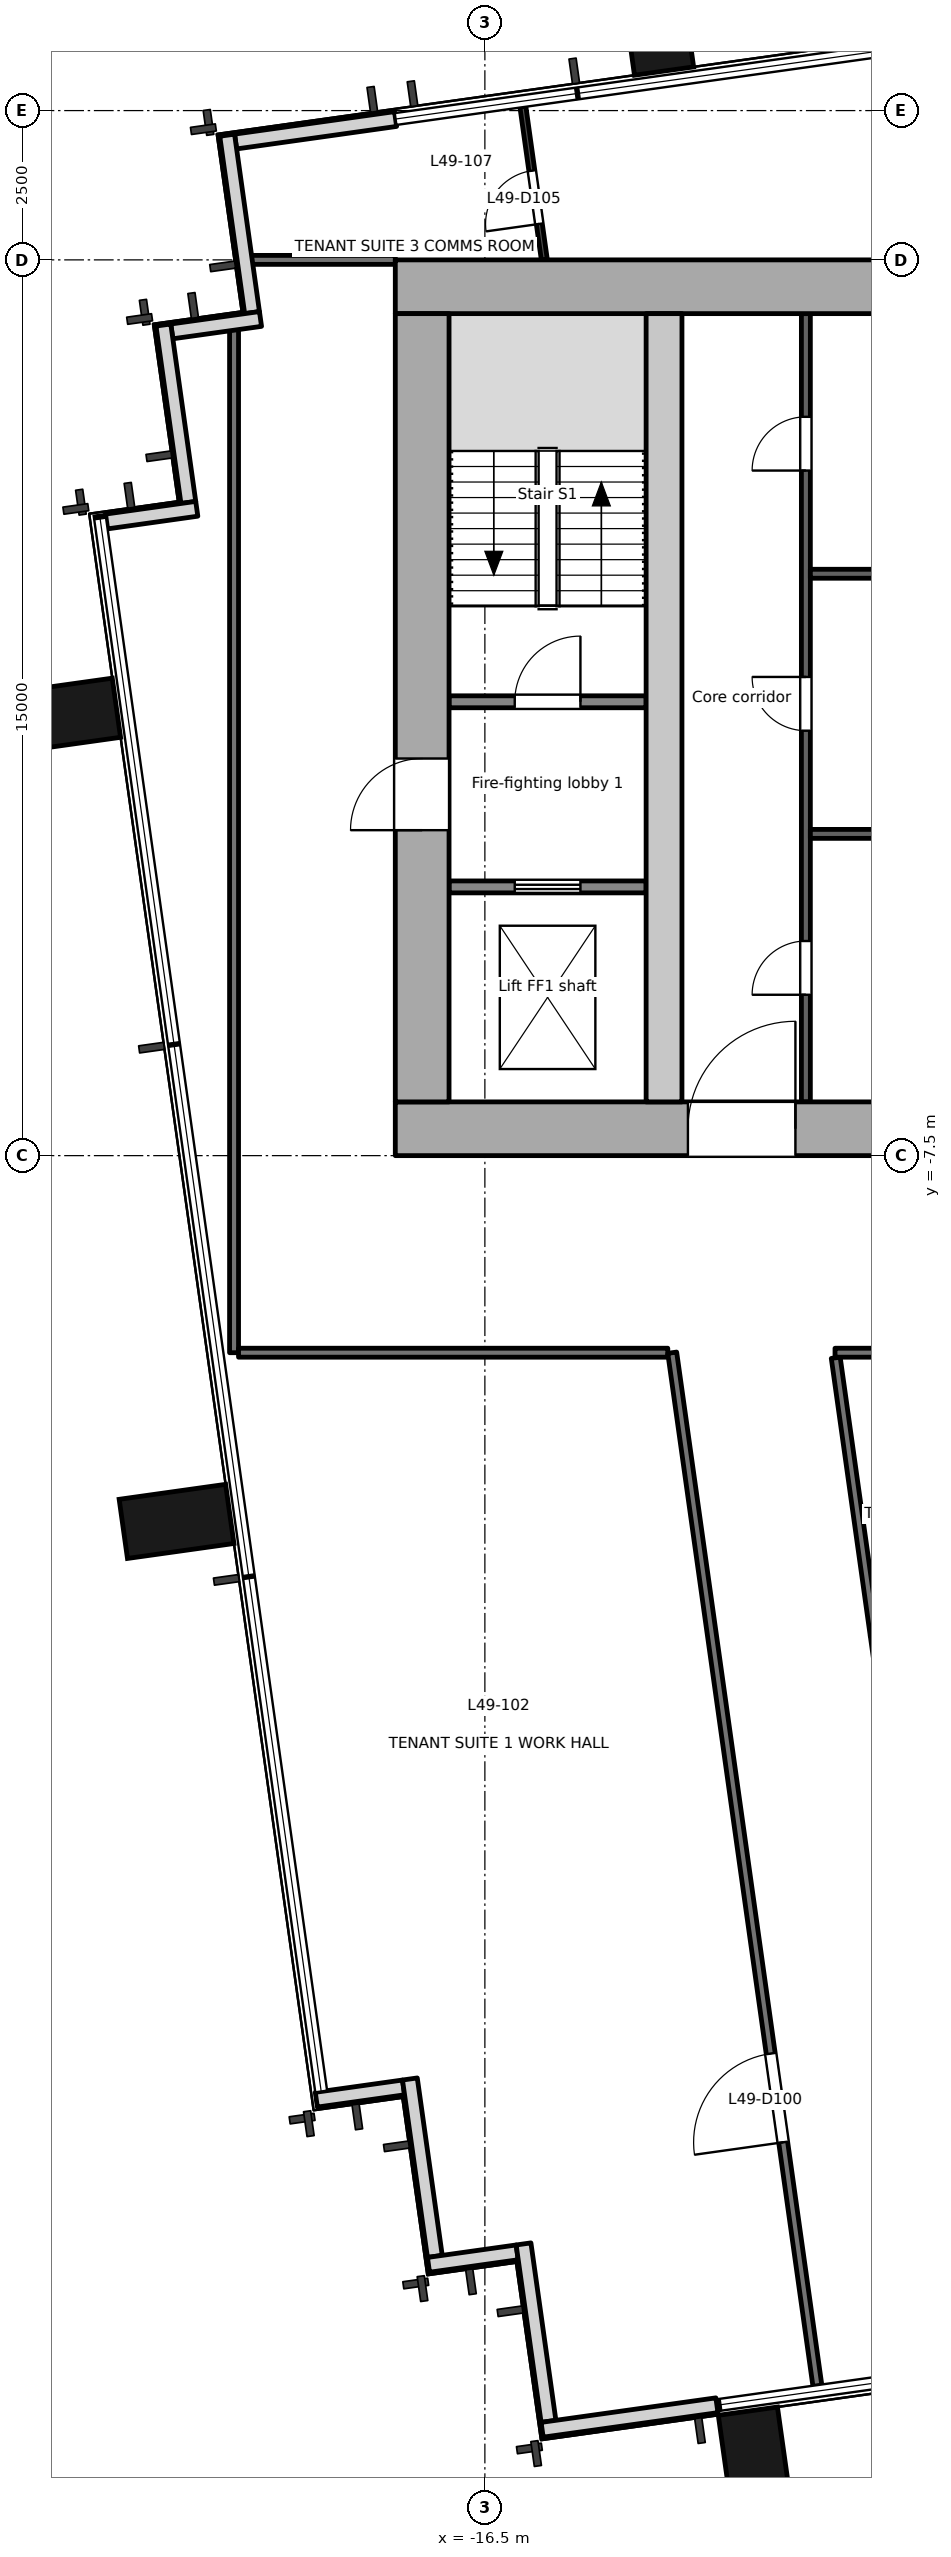
"""IFC4 building model, lengths in metres.
Left out: names, types, materials, properties, quantities, classifications, styles, units other than length and angle.
Written with IfcOpenShell. Run it as: python <this file> out.ifc"""

import sys

from ifc_helpers import new_model, si_unit, direction, frame, frame_2d, origin, origin_2d, place, context, subcontext, project, spatial, rectangle, extrude, element, fill, save


model = new_model("IFC4")
c1 = context("Model", 3, precision=1e-05, world=origin(), true_north=direction((0.0, 1.0)))
c2 = subcontext(c1, "Body", "Model", "MODEL_VIEW")
j1 = project(units=[si_unit("LENGTHUNIT", "METRE"), si_unit("PLANEANGLEUNIT", "RADIAN")], contexts=[c1])
p1 = place(None, origin())
s1 = spatial("IfcSite", under=j1, at=p1, CompositionType="ELEMENT")
p2 = place(p1, origin())
s2 = spatial("IfcBuilding", under=s1, at=p2, CompositionType="ELEMENT")
p3 = place(p2, frame((0.0, 0.0, 217.4)))
s3 = spatial("IfcBuildingStorey", under=s2, at=p3, CompositionType="ELEMENT", Elevation=217.4)
for number, where, z_axis, x_axis in (
    (1, (-11.971, -29.416, -0.2), (0.0, 0.0, 1.0), (0.99, 0.139, 0.0)),
    (2, (-21.663, -13.625, -0.2), (0.0, 0.0, 1.0), (-0.139, 0.99, 0.0)),
    (3, (-23.561, -0.125, -0.2), (0.0, 0.0, 1.0), (-0.139, 0.99, 0.0)),
    (4, (-13.625, 11.553, -0.2), (0.0, 0.0, 1.0), (0.99, 0.139, 0.0)),
):
    element("IfcColumn", number, at=place(p3, frame(where, z_axis=z_axis, x_axis=x_axis)), inside=s3, PredefinedType="COLUMN", context=c2, shape_type="SweptSolid", body=[
        extrude(rectangle(XDim=1.0, YDim=1.8, at=origin_2d()), origin(), (0.0, 0.0, 1.0), 3.9),
    ])
p4 = place(p3, frame((-17.995, 9.859, 0.0), z_axis=(0.0, 0.0, 1.0), x_axis=(-0.99024510326, -0.139336411139, 0.0)))
e5 = element("IfcWall", 5, at=p4, inside=s3, PredefinedType="SOLIDWALL", context=c2, shape_type="SweptSolid", body=[
    extrude(rectangle(XDim=2.705, YDim=0.25, at=frame_2d((1.353, 0.0))), origin(), (0.0, 0.0, 1.0), 3.7),
])
p5 = place(p3, frame((-20.815, 9.588, 0.0), z_axis=(0.0, 0.0, 1.0), x_axis=(0.138983028379, -0.9902947631, 0.0)))
e6 = element("IfcWall", 6, at=p5, inside=s3, PredefinedType="SOLIDWALL", context=c2, shape_type="SweptSolid", body=[
    extrude(rectangle(XDim=3.0, YDim=0.25, at=frame_2d((1.5, 0.0))), origin(), (0.0, 0.0, 1.0), 3.7),
])
p6 = place(p3, frame((-20.257, 6.51, 0.0), z_axis=(0.0, 0.0, 1.0), x_axis=(-0.990330117064, -0.138730887823, 0.0)))
e7 = element("IfcWall", 7, at=p6, inside=s3, PredefinedType="SOLIDWALL", context=c2, shape_type="SweptSolid", body=[
    extrude(rectangle(XDim=1.499, YDim=0.25, at=frame_2d((0.75, 0.0))), origin(), (0.0, 0.0, 1.0), 3.7),
])
p7 = place(p3, frame((-21.883, 6.409, 0.0), z_axis=(0.0, 0.0, 1.0), x_axis=(0.139324658755, -0.990246756855, 0.0)))
e8 = element("IfcWall", 8, at=p7, inside=s3, PredefinedType="SOLIDWALL", context=c2, shape_type="SweptSolid", body=[
    extrude(rectangle(XDim=3.0, YDim=0.25, at=frame_2d((1.5, 0.0))), origin(), (0.0, 0.0, 1.0), 3.7),
])
p8 = place(p3, frame((-21.324, 3.332, 0.0), z_axis=(0.0, 0.0, 1.0), x_axis=(-0.990238641016, -0.139382329723, 0.0)))
e9 = element("IfcWall", 9, at=p8, inside=s3, PredefinedType="SOLIDWALL", context=c2, shape_type="SweptSolid", body=[
    extrude(rectangle(XDim=1.526, YDim=0.25, at=frame_2d((0.763, 0.0))), origin(), (0.0, 0.0, 1.0), 3.7),
])
p9 = place(p3, frame((-19.322, -23.309, 0.0), z_axis=(0.0, 0.0, 1.0), x_axis=(0.990235520307, 0.13940449893, 0.0)))
e10 = element("IfcWall", 10, at=p9, inside=s3, PredefinedType="SOLIDWALL", context=c2, shape_type="SweptSolid", body=[
    extrude(rectangle(XDim=1.475, YDim=0.25, at=frame_2d((0.737, 0.0))), origin(), (0.0, 0.0, 1.0), 3.7),
])
p10 = place(p3, frame((-17.756, -22.962, 0.0), z_axis=(0.0, 0.0, 1.0), x_axis=(0.139393225799, -0.990237107263, 0.0)))
e11 = element("IfcWall", 11, at=p10, inside=s3, PredefinedType="SOLIDWALL", context=c2, shape_type="SweptSolid", body=[
    extrude(rectangle(XDim=3.0, YDim=0.25, at=frame_2d((1.5, 0.0))), origin(), (0.0, 0.0, 1.0), 3.7),
])
p11 = place(p3, frame((-17.444, -26.074, 0.0), z_axis=(0.0, 0.0, 1.0), x_axis=(0.990240434918, 0.139369584395, 0.0)))
e12 = element("IfcWall", 12, at=p11, inside=s3, PredefinedType="SOLIDWALL", context=c2, shape_type="SweptSolid", body=[
    extrude(rectangle(XDim=1.5, YDim=0.25, at=frame_2d((0.75, 0.0))), origin(), (0.0, 0.0, 1.0), 3.7),
])
p12 = place(p3, frame((-15.853, -25.724, 0.0), z_axis=(0.0, 0.0, 1.0), x_axis=(0.139302206688, -0.990249915532, 0.0)))
e13 = element("IfcWall", 13, at=p12, inside=s3, PredefinedType="SOLIDWALL", context=c2, shape_type="SweptSolid", body=[
    extrude(rectangle(XDim=3.0, YDim=0.25, at=frame_2d((1.5, 0.0))), origin(), (0.0, 0.0, 1.0), 3.7),
])
p13 = place(p3, frame((-15.541, -28.836, 0.0), z_axis=(0.0, 0.0, 1.0), x_axis=(0.990285396533, 0.139049751574, 0.0)))
e14 = element("IfcWall", 14, at=p13, inside=s3, PredefinedType="SOLIDWALL", context=c2, shape_type="SweptSolid", body=[
    extrude(rectangle(XDim=2.955, YDim=0.25, at=frame_2d((1.478, 0.0))), origin(), (0.0, 0.0, 1.0), 3.7),
])
p14 = place(p3, frame((-18.0, -7.05, -0.2), z_axis=(0.0, 0.0, 1.0), x_axis=(1.0, 0.0, 0.0)))
e15 = element("IfcWall", 15, at=p14, inside=s3, PredefinedType="SHEAR", context=c2, shape_type="SweptSolid", body=[
    extrude(rectangle(XDim=36.0, YDim=0.9, at=frame_2d((18.0, 0.0))), origin(), (0.0, 0.0, 1.0), 3.9),
])
p15 = place(p14, frame((4.9, 0.0, 0.2)))
e16 = element("IfcOpeningElement", 16, at=p15, cuts=e15, PredefinedType="OPENING", context=c2, shape_type="SweptSolid", body=[
    extrude(rectangle(XDim=1.8, YDim=2.1, at=frame_2d((0.9, 1.05))), frame((0.0, 0.46, 0.0), z_axis=(0.0, -1.0, 0.0), x_axis=(1.0, 0.0, 0.0)), (0.0, 0.0, 1.0), 0.921),
])
p16 = place(p14, frame((16.8, 0.0, 0.2)))
e17 = element("IfcOpeningElement", 17, at=p16, cuts=e15, PredefinedType="OPENING", context=c2, shape_type="SweptSolid", body=[
    extrude(rectangle(XDim=2.4, YDim=2.1, at=frame_2d((1.2, 1.05))), frame((0.0, 0.46, 0.0), z_axis=(0.0, -1.0, 0.0), x_axis=(1.0, 0.0, 0.0)), (0.0, 0.0, 1.0), 0.921),
])
p17 = place(p14, frame((26.1, 0.0, 0.2)))
e18 = element("IfcOpeningElement", 18, at=p17, cuts=e15, PredefinedType="OPENING", context=c2, shape_type="SweptSolid", body=[
    extrude(rectangle(XDim=2.4, YDim=2.1, at=frame_2d((1.2, 1.05))), frame((0.0, 0.46, 0.0), z_axis=(0.0, -1.0, 0.0), x_axis=(1.0, 0.0, 0.0)), (0.0, 0.0, 1.0), 0.921),
])
p18 = place(p3, frame((-18.0, 7.05, -0.2), z_axis=(0.0, 0.0, 1.0), x_axis=(1.0, 0.0, 0.0)))
e19 = element("IfcWall", 19, at=p18, inside=s3, PredefinedType="SHEAR", context=c2, shape_type="SweptSolid", body=[
    extrude(rectangle(XDim=36.0, YDim=0.9, at=frame_2d((18.0, 0.0))), origin(), (0.0, 0.0, 1.0), 3.9),
])
p19 = place(p3, frame((-17.55, -6.6, -0.2), z_axis=(0.0, 0.0, 1.0), x_axis=(0.0, 1.0, 0.0)))
e20 = element("IfcWall", 20, at=p19, inside=s3, PredefinedType="SHEAR", context=c2, shape_type="SweptSolid", body=[
    extrude(rectangle(XDim=13.2, YDim=0.9, at=frame_2d((6.6, 0.0))), origin(), (0.0, 0.0, 1.0), 3.9),
])
p20 = place(p19, frame((4.55, 0.0, 0.2)))
e21 = element("IfcOpeningElement", 21, at=p20, cuts=e20, PredefinedType="OPENING", context=c2, shape_type="SweptSolid", body=[
    extrude(rectangle(XDim=1.2, YDim=2.1, at=frame_2d((0.6, 1.05))), frame((0.0, 0.46, 0.0), z_axis=(0.0, -1.0, 0.0), x_axis=(1.0, 0.0, 0.0)), (0.0, 0.0, 1.0), 0.921),
])
p21 = place(p3, frame((-13.5, -6.6, -0.2), z_axis=(0.0, 0.0, 1.0), x_axis=(0.0, 1.0, 0.0)))
e22 = element("IfcWall", 22, at=p21, inside=s3, PredefinedType="SHEAR", context=c2, shape_type="SweptSolid", body=[
    extrude(rectangle(XDim=13.2, YDim=0.6, at=frame_2d((6.6, 0.0))), origin(), (0.0, 0.0, 1.0), 3.9),
])
p22 = place(p3, frame((-17.1, -3.0, 0.0), z_axis=(0.0, 0.0, 1.0), x_axis=(1.0, 0.0, 0.0)))
e23 = element("IfcWall", 23, at=p22, inside=s3, PredefinedType="PARTITIONING", context=c2, shape_type="SweptSolid", body=[
    extrude(rectangle(XDim=3.3, YDim=0.2, at=frame_2d((1.65, 0.0))), origin(), (0.0, 0.0, 1.0), 3.7),
])
p23 = place(p22, frame((1.1, 0.0, 0.0)))
e24 = element("IfcOpeningElement", 24, at=p23, cuts=e23, PredefinedType="OPENING", context=c2, shape_type="SweptSolid", body=[
    extrude(rectangle(XDim=1.1, YDim=2.1, at=frame_2d((0.55, 1.05))), frame((0.0, 0.111, 0.0), z_axis=(0.0, -1.0, 0.0), x_axis=(1.0, 0.0, 0.0)), (0.0, 0.0, 1.0), 0.221),
])
p24 = place(p3, frame((-17.1, 0.1, 0.0), z_axis=(0.0, 0.0, 1.0), x_axis=(1.0, 0.0, 0.0)))
e25 = element("IfcWall", 25, at=p24, inside=s3, PredefinedType="PARTITIONING", context=c2, shape_type="SweptSolid", body=[
    extrude(rectangle(XDim=3.3, YDim=0.2, at=frame_2d((1.65, 0.0))), origin(), (0.0, 0.0, 1.0), 3.7),
])
p25 = place(p24, frame((1.1, 0.0, 0.0)))
e26 = element("IfcOpeningElement", 26, at=p25, cuts=e25, PredefinedType="OPENING", context=c2, shape_type="SweptSolid", body=[
    extrude(rectangle(XDim=1.1, YDim=2.1, at=frame_2d((0.55, 1.05))), frame((0.0, 0.111, 0.0), z_axis=(0.0, -1.0, 0.0), x_axis=(1.0, 0.0, 0.0)), (0.0, 0.0, 1.0), 0.221),
])
p26 = place(p3, frame((-11.125, -6.6, 0.0), z_axis=(0.0, 0.0, 1.0), x_axis=(0.0, 1.0, 0.0)))
e27 = element("IfcWall", 27, at=p26, inside=s3, PredefinedType="PARTITIONING", context=c2, shape_type="SweptSolid", body=[
    extrude(rectangle(XDim=13.2, YDim=0.15, at=frame_2d((6.6, 0.0))), origin(), (0.0, 0.0, 1.0), 3.7),
])
p27 = place(p26, frame((1.794, 0.0, 0.0)))
e28 = element("IfcOpeningElement", 28, at=p27, cuts=e27, PredefinedType="OPENING", context=c2, shape_type="SweptSolid", body=[
    extrude(rectangle(XDim=0.9, YDim=2.1, at=frame_2d((0.45, 1.05))), frame((0.0, 0.085, 0.0), z_axis=(0.0, -1.0, 0.0), x_axis=(1.0, 0.0, 0.0)), (0.0, 0.0, 1.0), 0.171),
])
p28 = place(p26, frame((6.216, 0.0, 0.0)))
e29 = element("IfcOpeningElement", 29, at=p28, cuts=e27, PredefinedType="OPENING", context=c2, shape_type="SweptSolid", body=[
    extrude(rectangle(XDim=0.9, YDim=2.1, at=frame_2d((0.45, 1.05))), frame((0.0, 0.085, 0.0), z_axis=(0.0, -1.0, 0.0), x_axis=(1.0, 0.0, 0.0)), (0.0, 0.0, 1.0), 0.171),
])
p29 = place(p26, frame((10.572, 0.0, 0.0)))
e30 = element("IfcOpeningElement", 30, at=p29, cuts=e27, PredefinedType="OPENING", context=c2, shape_type="SweptSolid", body=[
    extrude(rectangle(XDim=0.9, YDim=2.1, at=frame_2d((0.45, 1.05))), frame((0.0, 0.085, 0.0), z_axis=(0.0, -1.0, 0.0), x_axis=(1.0, 0.0, 0.0)), (0.0, 0.0, 1.0), 0.171),
])
for number, where, z_axis, x_axis in (
    (31, (-11.05, -2.112, 0.0), (0.0, 0.0, 1.0), (1.0, 0.0, 0.0)),
    (32, (-11.05, 2.244, 0.0), (0.0, 0.0, 1.0), (1.0, 0.0, 0.0)),
):
    element("IfcWall", number, at=place(p3, frame(where, z_axis=z_axis, x_axis=x_axis)), inside=s3, PredefinedType="PARTITIONING", context=c2, shape_type="SweptSolid", body=[
        extrude(rectangle(XDim=6.25, YDim=0.15, at=frame_2d((3.125, 0.0))), origin(), (0.0, 0.0, 1.0), 3.7),
    ])
p30 = place(p3, frame((-20.7, -10.8, 0.0), z_axis=(0.0, 0.0, 1.0), x_axis=(0.0, 1.0, 0.0)))
e33 = element("IfcWall", 33, at=p30, inside=s3, PredefinedType="PARTITIONING", context=c2, shape_type="SweptSolid", body=[
    extrude(rectangle(XDim=17.156, YDim=0.15, at=frame_2d((8.578, 0.0))), origin(), (0.0, 0.0, 1.0), 3.4),
])
p31 = place(p3, frame((-13.437, -10.8, 0.0), z_axis=(0.0, 0.0, 1.0), x_axis=(-1.0, 0.0, 0.0)))
e34 = element("IfcWall", 34, at=p31, inside=s3, PredefinedType="PARTITIONING", context=c2, shape_type="SweptSolid", body=[
    extrude(rectangle(XDim=7.188, YDim=0.15, at=frame_2d((3.594, 0.0))), origin(), (0.0, 0.0, 1.0), 3.7),
])
p32 = place(p3, frame((-10.932, -28.099, 0.0), z_axis=(0.0, 0.0, 1.0), x_axis=(-0.139168963114, 0.990268650269, 0.0)))
e35 = element("IfcWall", 35, at=p32, inside=s3, PredefinedType="PARTITIONING", context=c2, shape_type="SweptSolid", body=[
    extrude(rectangle(XDim=17.469, YDim=0.15, at=frame_2d((8.734, 0.0))), origin(), (0.0, 0.0, 1.0), 3.7),
])
p33 = place(p32, frame((4.117, 0.0, 0.0)))
e36 = element("IfcOpeningElement", 36, at=p33, cuts=e35, PredefinedType="OPENING", context=c2, shape_type="SweptSolid", body=[
    extrude(rectangle(XDim=1.5, YDim=2.1, at=frame_2d((0.75, 1.05))), frame((0.0, 0.085, 0.0), z_axis=(0.0, -1.0, 0.0), x_axis=(1.0, 0.0, 0.0)), (0.0, 0.0, 1.0), 0.171),
])
p34 = place(p3, frame((-20.431, 7.5, 0.0), z_axis=(0.0, 0.0, 1.0), x_axis=(1.0, 0.0, 0.0)))
e37 = element("IfcWall", 37, at=p34, inside=s3, PredefinedType="PARTITIONING", context=c2, shape_type="SweptSolid", body=[
    extrude(rectangle(XDim=2.431, YDim=0.15, at=frame_2d((1.215, 0.0))), origin(), (0.0, 0.0, 1.0), 3.7),
])
p35 = place(p3, frame((-9.972, -15.533, 0.0), z_axis=(0.0, 0.0, 1.0), x_axis=(0.139149686673, -0.990271359123, 0.0)))
e38 = element("IfcWall", 38, at=p35, inside=s3, PredefinedType="PARTITIONING", context=c2, shape_type="SweptSolid", body=[
    extrude(rectangle(XDim=12.31, YDim=0.15, at=frame_2d((6.155, 0.0))), origin(), (0.0, 0.0, 1.0), 2.8),
])
p36 = place(p35, frame((7.757, 0.0, 0.0)))
e39 = element("IfcOpeningElement", 39, at=p36, cuts=e38, PredefinedType="OPENING", context=c2, shape_type="SweptSolid", body=[
    extrude(rectangle(XDim=1.8, YDim=2.1, at=frame_2d((0.9, 1.05))), frame((0.0, 0.085, 0.0), z_axis=(0.0, -1.0, 0.0), x_axis=(1.0, 0.0, 0.0)), (0.0, 0.0, 1.0), 0.171),
])
p37 = place(p3, frame((-10.625, -10.885, 0.0), z_axis=(0.0, 0.0, 1.0), x_axis=(0.139112996275, -0.990276514044, 0.0)))
e40 = element("IfcWall", 40, at=p37, inside=s3, PredefinedType="PARTITIONING", context=c2, shape_type="SweptSolid", body=[
    extrude(rectangle(XDim=4.695, YDim=0.15, at=frame_2d((2.347, 0.0))), origin(), (0.0, 0.0, 1.0), 3.7),
])
p38 = place(p3, frame((-4.557, -10.8, 0.0), z_axis=(0.0, 0.0, 1.0), x_axis=(-1.0, 0.0, 0.0)))
e41 = element("IfcWall", 41, at=p38, inside=s3, PredefinedType="PARTITIONING", context=c2, shape_type="SweptSolid", body=[
    extrude(rectangle(XDim=6.08, YDim=0.15, at=frame_2d((3.04, 0.0))), origin(), (0.0, 0.0, 1.0), 2.8),
])
p39 = place(p3, frame((-15.504, 7.5, 0.0), z_axis=(0.0, 0.0, 1.0), x_axis=(-0.138928669032, 0.990302390647, 0.0)))
e42 = element("IfcWall", 42, at=p39, inside=s3, PredefinedType="PARTITIONING", context=c2, shape_type="SweptSolid", body=[
    extrude(rectangle(XDim=2.592, YDim=0.1, at=frame_2d((1.296, 0.0))), origin(), (0.0, 0.0, 1.0), 3.7),
])
p40 = place(p39, frame((0.608, 0.0, 0.0)))
e43 = element("IfcOpeningElement", 43, at=p40, cuts=e42, PredefinedType="OPENING", context=c2, shape_type="SweptSolid", body=[
    extrude(rectangle(XDim=0.9, YDim=2.1, at=frame_2d((0.45, 1.05))), frame((0.0, 0.061, 0.0), z_axis=(0.0, -1.0, 0.0), x_axis=(1.0, 0.0, 0.0)), (0.0, 0.0, 1.0), 0.121),
])
p41 = place(p23, origin())
e44 = element("IfcDoor", 44, at=p41, inside=s3, OperationType="DOUBLE_DOOR_SLIDING", PredefinedType="DOOR", context=c2, shape_type="SweptSolid", body=[
    extrude(rectangle(XDim=1.1, YDim=2.1, at=frame_2d((0.55, 1.05))), frame((0.0, 0.025, 0.0), z_axis=(0.0, -1.0, 0.0), x_axis=(1.0, 0.0, 0.0)), (0.0, 0.0, 1.0), 0.05),
])
fill(e24, e44)
p42 = place(p20, origin())
e45 = element("IfcDoor", 45, at=p42, inside=s3, OperationType="SINGLE_SWING_LEFT", PredefinedType="DOOR", context=c2, shape_type="SweptSolid", body=[
    extrude(rectangle(XDim=1.2, YDim=2.1, at=frame_2d((0.6, 1.05))), frame((0.0, 0.025, 0.0), z_axis=(0.0, -1.0, 0.0), x_axis=(1.0, 0.0, 0.0)), (0.0, 0.0, 1.0), 0.05),
])
fill(e21, e45)
p43 = place(p25, origin())
e46 = element("IfcDoor", 46, at=p43, inside=s3, OperationType="SINGLE_SWING_RIGHT", PredefinedType="DOOR", context=c2, shape_type="SweptSolid", body=[
    extrude(rectangle(XDim=1.1, YDim=2.1, at=frame_2d((0.55, 1.05))), frame((0.0, 0.025, 0.0), z_axis=(0.0, -1.0, 0.0), x_axis=(1.0, 0.0, 0.0)), (0.0, 0.0, 1.0), 0.05),
])
fill(e26, e46)
p44 = place(p27, origin())
e47 = element("IfcDoor", 47, at=p44, inside=s3, OperationType="SINGLE_SWING_LEFT", PredefinedType="DOOR", context=c2, shape_type="SweptSolid", body=[
    extrude(rectangle(XDim=0.9, YDim=2.1, at=frame_2d((0.45, 1.05))), frame((0.0, 0.025, 0.0), z_axis=(0.0, -1.0, 0.0), x_axis=(1.0, 0.0, 0.0)), (0.0, 0.0, 1.0), 0.05),
])
fill(e28, e47)
p45 = place(p28, origin())
e48 = element("IfcDoor", 48, at=p45, inside=s3, OperationType="SINGLE_SWING_RIGHT", PredefinedType="DOOR", context=c2, shape_type="SweptSolid", body=[
    extrude(rectangle(XDim=0.9, YDim=2.1, at=frame_2d((0.45, 1.05))), frame((0.0, 0.025, 0.0), z_axis=(0.0, -1.0, 0.0), x_axis=(1.0, 0.0, 0.0)), (0.0, 0.0, 1.0), 0.05),
])
fill(e29, e48)
p46 = place(p29, origin())
e49 = element("IfcDoor", 49, at=p46, inside=s3, OperationType="SINGLE_SWING_LEFT", PredefinedType="DOOR", context=c2, shape_type="SweptSolid", body=[
    extrude(rectangle(XDim=0.9, YDim=2.1, at=frame_2d((0.45, 1.05))), frame((0.0, 0.025, 0.0), z_axis=(0.0, -1.0, 0.0), x_axis=(1.0, 0.0, 0.0)), (0.0, 0.0, 1.0), 0.05),
])
fill(e30, e49)
p47 = place(p15, origin())
e50 = element("IfcDoor", 50, at=p47, inside=s3, OperationType="SINGLE_SWING_RIGHT", PredefinedType="DOOR", context=c2, shape_type="SweptSolid", body=[
    extrude(rectangle(XDim=1.8, YDim=2.1, at=frame_2d((0.9, 1.05))), frame((0.0, 0.025, 0.0), z_axis=(0.0, -1.0, 0.0), x_axis=(1.0, 0.0, 0.0)), (0.0, 0.0, 1.0), 0.05),
])
fill(e16, e50)
p48 = place(p33, origin())
e51 = element("IfcDoor", 51, at=p48, inside=s3, OperationType="DOUBLE_DOOR_SINGLE_SWING", PredefinedType="DOOR", context=c2, shape_type="SweptSolid", body=[
    extrude(rectangle(XDim=1.5, YDim=2.1, at=frame_2d((0.75, 1.05))), frame((0.0, 0.025, 0.0), z_axis=(0.0, -1.0, 0.0), x_axis=(1.0, 0.0, 0.0)), (0.0, 0.0, 1.0), 0.05),
])
fill(e36, e51)
p49 = place(p40, origin())
e52 = element("IfcDoor", 52, at=p49, inside=s3, OperationType="SINGLE_SWING_LEFT", PredefinedType="DOOR", context=c2, shape_type="SweptSolid", body=[
    extrude(rectangle(XDim=0.9, YDim=2.1, at=frame_2d((0.45, 1.05))), frame((0.0, 0.025, 0.0), z_axis=(0.0, -1.0, 0.0), x_axis=(1.0, 0.0, 0.0)), (0.0, 0.0, 1.0), 0.05),
])
fill(e43, e52)
save(model, sys.argv[1])
